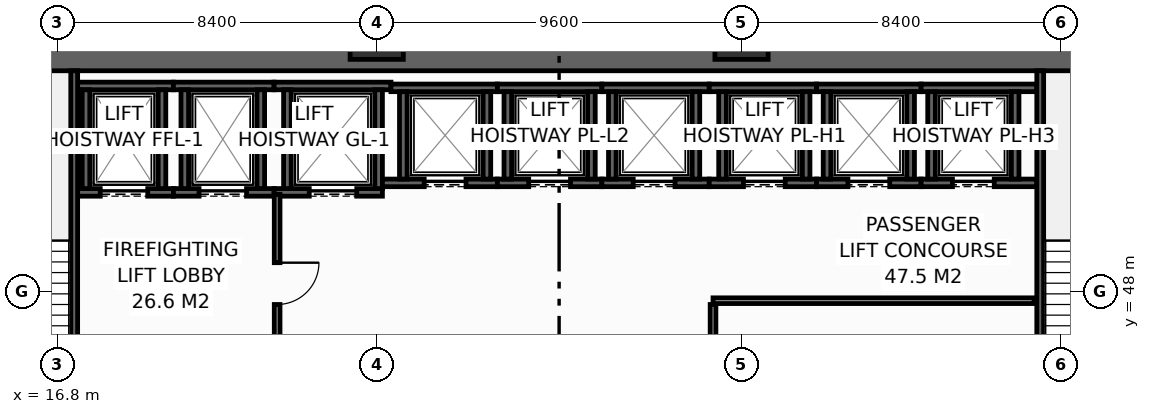
"""IFC4 building model, lengths in metres.
Left out: names, types, materials, properties, quantities, classifications, styles, units other than length and angle.
Written with IfcOpenShell. Run it as: python <this file> out.ifc"""

import sys

from ifc_helpers import new_model, si_unit, direction, frame, frame_2d, origin, origin_2d, place, context, subcontext, project, spatial, rectangle, hollow_rectangle, extrude, element, fill, save


model = new_model("IFC4")
c1 = context("Model", 3, precision=1e-05, world=origin(), true_north=direction((0.0, 1.0)))
c2 = subcontext(c1, "Body", "Model", "MODEL_VIEW")
j1 = project(units=[si_unit("LENGTHUNIT", "METRE"), si_unit("PLANEANGLEUNIT", "RADIAN")], contexts=[c1])
p1 = place(None, origin())
s1 = spatial("IfcSite", under=j1, at=p1, CompositionType="ELEMENT")
p2 = place(p1, origin())
s2 = spatial("IfcBuilding", under=s1, at=p2, CompositionType="ELEMENT")
p3 = place(p2, origin())
s3 = spatial("IfcBuildingStorey", under=s2, at=p3, CompositionType="ELEMENT", Elevation=0.0)
p4 = place(p3, frame((13.5, 54.1, 0.0), z_axis=(0.0, 0.0, 1.0), x_axis=(1.0, 0.0, 0.0)))
e1 = element("IfcWall", 1, at=p4, inside=s3, PredefinedType="SHEAR", context=c2, shape_type="SweptSolid", body=[
    extrude(rectangle(XDim=32.9, YDim=0.6, at=frame_2d((16.45, 0.0))), origin(), (0.0, 0.0, 1.0), 5.7),
])
for number, where, z_axis, x_axis in (
    (2, (25.2, 54.8, 0.0), (0.0, 0.0, 1.0), (1.0, 0.0, 0.0)),
    (3, (34.8, 54.8, 0.0), (0.0, 0.0, 1.0), (1.0, 0.0, 0.0)),
):
    element("IfcColumn", number, at=place(p3, frame(where, z_axis=z_axis, x_axis=x_axis)), inside=s3, PredefinedType="COLUMN", context=c2, shape_type="SweptSolid", body=[
        extrude(hollow_rectangle(XDim=1.4, YDim=1.4, WallThickness=0.065, at=origin_2d()), origin(), (0.0, 0.0, 1.0), 6.0),
    ])
p5 = place(p3, frame((17.33, 50.6, 0.0), z_axis=(0.0, 0.0, 1.0), x_axis=(1.0, 0.0, 0.0)))
e4 = element("IfcWall", 4, at=p5, inside=s3, PredefinedType="SHEAR", context=c2, shape_type="SweptSolid", body=[
    extrude(rectangle(XDim=2.52, YDim=0.2, at=frame_2d((1.26, 0.0))), origin(), (0.0, 0.0, 1.0), 5.7),
])
p6 = place(p5, frame((0.595, 0.0, 0.0)))
e5 = element("IfcOpeningElement", 5, at=p6, cuts=e4, PredefinedType="OPENING", context=c2, shape_type="SweptSolid", body=[
    extrude(rectangle(XDim=1.25, YDim=2.3, at=frame_2d((0.625, 1.15))), frame((0.0, 0.11, 0.0), z_axis=(0.0, -1.0, 0.0), x_axis=(1.0, 0.0, 0.0)), (0.0, 0.0, 1.0), 0.22),
])
p7 = place(p3, frame((17.33, 53.4, 0.0), z_axis=(0.0, 0.0, 1.0), x_axis=(1.0, 0.0, 0.0)))
e6 = element("IfcWall", 6, at=p7, inside=s3, PredefinedType="SHEAR", context=c2, shape_type="SweptSolid", body=[
    extrude(rectangle(XDim=2.52, YDim=0.2, at=frame_2d((1.26, 0.0))), origin(), (0.0, 0.0, 1.0), 5.7),
])
for number, where, z_axis, x_axis in (
    (7, (17.55, 50.7, 0.0), (0.0, 0.0, 1.0), (0.0, 1.0, 0.0)),
    (8, (19.55, 50.7, 0.0), (0.0, 0.0, 1.0), (0.0, 1.0, 0.0)),
):
    element("IfcWall", number, at=place(p3, frame(where, z_axis=z_axis, x_axis=x_axis)), inside=s3, PredefinedType="SHEAR", context=c2, shape_type="SweptSolid", body=[
        extrude(rectangle(XDim=2.6, YDim=0.2, at=frame_2d((1.3, 0.0))), origin(), (0.0, 0.0, 1.0), 5.7),
    ])
p8 = place(p3, frame((19.85, 50.6, 0.0), z_axis=(0.0, 0.0, 1.0), x_axis=(1.0, 0.0, 0.0)))
e9 = element("IfcWall", 9, at=p8, inside=s3, PredefinedType="SHEAR", context=c2, shape_type="SweptSolid", body=[
    extrude(rectangle(XDim=2.65, YDim=0.2, at=frame_2d((1.325, 0.0))), origin(), (0.0, 0.0, 1.0), 5.7),
])
p9 = place(p8, frame((0.675, 0.0, 0.0)))
e10 = element("IfcOpeningElement", 10, at=p9, cuts=e9, PredefinedType="OPENING", context=c2, shape_type="SweptSolid", body=[
    extrude(rectangle(XDim=1.25, YDim=2.3, at=frame_2d((0.625, 1.15))), frame((0.0, 0.11, 0.0), z_axis=(0.0, -1.0, 0.0), x_axis=(1.0, 0.0, 0.0)), (0.0, 0.0, 1.0), 0.22),
])
p10 = place(p3, frame((19.85, 53.4, 0.0), z_axis=(0.0, 0.0, 1.0), x_axis=(1.0, 0.0, 0.0)))
e11 = element("IfcWall", 11, at=p10, inside=s3, PredefinedType="SHEAR", context=c2, shape_type="SweptSolid", body=[
    extrude(rectangle(XDim=2.65, YDim=0.2, at=frame_2d((1.325, 0.0))), origin(), (0.0, 0.0, 1.0), 5.7),
])
for number, where, z_axis, x_axis in (
    (12, (20.15, 50.7, 0.0), (0.0, 0.0, 1.0), (0.0, 1.0, 0.0)),
    (13, (22.15, 50.7, 0.0), (0.0, 0.0, 1.0), (0.0, 1.0, 0.0)),
):
    element("IfcWall", number, at=place(p3, frame(where, z_axis=z_axis, x_axis=x_axis)), inside=s3, PredefinedType="SHEAR", context=c2, shape_type="SweptSolid", body=[
        extrude(rectangle(XDim=2.6, YDim=0.2, at=frame_2d((1.3, 0.0))), origin(), (0.0, 0.0, 1.0), 5.7),
    ])
p11 = place(p3, frame((22.5, 50.6, 0.0), z_axis=(0.0, 0.0, 1.0), x_axis=(1.0, 0.0, 0.0)))
e14 = element("IfcWall", 14, at=p11, inside=s3, PredefinedType="SHEAR", context=c2, shape_type="SweptSolid", body=[
    extrude(rectangle(XDim=2.85, YDim=0.2, at=frame_2d((1.425, 0.0))), origin(), (0.0, 0.0, 1.0), 5.7),
])
p12 = place(p11, frame((0.925, 0.0, 0.0)))
e15 = element("IfcOpeningElement", 15, at=p12, cuts=e14, PredefinedType="OPENING", context=c2, shape_type="SweptSolid", body=[
    extrude(rectangle(XDim=1.25, YDim=2.3, at=frame_2d((0.625, 1.15))), frame((0.0, 0.11, 0.0), z_axis=(0.0, -1.0, 0.0), x_axis=(1.0, 0.0, 0.0)), (0.0, 0.0, 1.0), 0.22),
])
p13 = place(p3, frame((22.5, 53.4, 0.0), z_axis=(0.0, 0.0, 1.0), x_axis=(1.0, 0.0, 0.0)))
e16 = element("IfcWall", 16, at=p13, inside=s3, PredefinedType="SHEAR", context=c2, shape_type="SweptSolid", body=[
    extrude(rectangle(XDim=3.075, YDim=0.2, at=frame_2d((1.538, 0.0))), origin(), (0.0, 0.0, 1.0), 5.7),
])
for number, where, z_axis, x_axis in (
    (17, (22.85, 50.7, 0.0), (0.0, 0.0, 1.0), (0.0, 1.0, 0.0)),
    (18, (25.25, 50.7, 0.0), (0.0, 0.0, 1.0), (0.0, 1.0, 0.0)),
):
    element("IfcWall", number, at=place(p3, frame(where, z_axis=z_axis, x_axis=x_axis)), inside=s3, PredefinedType="SHEAR", context=c2, shape_type="SweptSolid", body=[
        extrude(rectangle(XDim=2.6, YDim=0.2, at=frame_2d((1.3, 0.0))), origin(), (0.0, 0.0, 1.0), 5.7),
    ])
p14 = place(p3, frame((25.35, 50.85, 0.0), z_axis=(0.0, 0.0, 1.0), x_axis=(1.0, 0.0, 0.0)))
e19 = element("IfcWall", 19, at=p14, inside=s3, PredefinedType="SHEAR", context=c2, shape_type="SweptSolid", body=[
    extrude(rectangle(XDim=3.025, YDim=0.2, at=frame_2d((1.512, 0.0))), origin(), (0.0, 0.0, 1.0), 5.7),
])
p15 = place(p14, frame((1.1, 0.0, 0.0)))
e20 = element("IfcOpeningElement", 20, at=p15, cuts=e19, PredefinedType="OPENING", context=c2, shape_type="SweptSolid", body=[
    extrude(rectangle(XDim=1.1, YDim=2.2, at=frame_2d((0.55, 1.1))), frame((0.0, 0.11, 0.0), z_axis=(0.0, -1.0, 0.0), x_axis=(1.0, 0.0, 0.0)), (0.0, 0.0, 1.0), 0.22),
])
p16 = place(p3, frame((25.575, 53.35, 0.0), z_axis=(0.0, 0.0, 1.0), x_axis=(1.0, 0.0, 0.0)))
e21 = element("IfcWall", 21, at=p16, inside=s3, PredefinedType="SHEAR", context=c2, shape_type="SweptSolid", body=[
    extrude(rectangle(XDim=2.8, YDim=0.2, at=frame_2d((1.4, 0.0))), origin(), (0.0, 0.0, 1.0), 5.7),
])
for number, where, z_axis, x_axis in (
    (22, (25.9, 50.95, 0.0), (0.0, 0.0, 1.0), (0.0, 1.0, 0.0)),
    (23, (28.1, 50.95, 0.0), (0.0, 0.0, 1.0), (0.0, 1.0, 0.0)),
):
    element("IfcWall", number, at=place(p3, frame(where, z_axis=z_axis, x_axis=x_axis)), inside=s3, PredefinedType="SHEAR", context=c2, shape_type="SweptSolid", body=[
        extrude(rectangle(XDim=2.3, YDim=0.2, at=frame_2d((1.15, 0.0))), origin(), (0.0, 0.0, 1.0), 5.7),
    ])
p17 = place(p3, frame((28.375, 50.85, 0.0), z_axis=(0.0, 0.0, 1.0), x_axis=(1.0, 0.0, 0.0)))
e24 = element("IfcWall", 24, at=p17, inside=s3, PredefinedType="SHEAR", context=c2, shape_type="SweptSolid", body=[
    extrude(rectangle(XDim=2.75, YDim=0.2, at=frame_2d((1.375, 0.0))), origin(), (0.0, 0.0, 1.0), 5.7),
])
p18 = place(p17, frame((0.825, 0.0, 0.0)))
e25 = element("IfcOpeningElement", 25, at=p18, cuts=e24, PredefinedType="OPENING", context=c2, shape_type="SweptSolid", body=[
    extrude(rectangle(XDim=1.1, YDim=2.2, at=frame_2d((0.55, 1.1))), frame((0.0, 0.11, 0.0), z_axis=(0.0, -1.0, 0.0), x_axis=(1.0, 0.0, 0.0)), (0.0, 0.0, 1.0), 0.22),
])
p19 = place(p3, frame((28.375, 53.35, 0.0), z_axis=(0.0, 0.0, 1.0), x_axis=(1.0, 0.0, 0.0)))
e26 = element("IfcWall", 26, at=p19, inside=s3, PredefinedType="SHEAR", context=c2, shape_type="SweptSolid", body=[
    extrude(rectangle(XDim=2.75, YDim=0.2, at=frame_2d((1.375, 0.0))), origin(), (0.0, 0.0, 1.0), 5.7),
])
for number, where, z_axis, x_axis in (
    (27, (28.65, 50.95, 0.0), (0.0, 0.0, 1.0), (0.0, 1.0, 0.0)),
    (28, (30.85, 50.95, 0.0), (0.0, 0.0, 1.0), (0.0, 1.0, 0.0)),
):
    element("IfcWall", number, at=place(p3, frame(where, z_axis=z_axis, x_axis=x_axis)), inside=s3, PredefinedType="SHEAR", context=c2, shape_type="SweptSolid", body=[
        extrude(rectangle(XDim=2.3, YDim=0.2, at=frame_2d((1.15, 0.0))), origin(), (0.0, 0.0, 1.0), 5.7),
    ])
p20 = place(p3, frame((31.125, 50.85, 0.0), z_axis=(0.0, 0.0, 1.0), x_axis=(1.0, 0.0, 0.0)))
e29 = element("IfcWall", 29, at=p20, inside=s3, PredefinedType="SHEAR", context=c2, shape_type="SweptSolid", body=[
    extrude(rectangle(XDim=2.825, YDim=0.2, at=frame_2d((1.413, 0.0))), origin(), (0.0, 0.0, 1.0), 5.7),
])
p21 = place(p20, frame((0.825, 0.0, 0.0)))
e30 = element("IfcOpeningElement", 30, at=p21, cuts=e29, PredefinedType="OPENING", context=c2, shape_type="SweptSolid", body=[
    extrude(rectangle(XDim=1.1, YDim=2.2, at=frame_2d((0.55, 1.1))), frame((0.0, 0.11, 0.0), z_axis=(0.0, -1.0, 0.0), x_axis=(1.0, 0.0, 0.0)), (0.0, 0.0, 1.0), 0.22),
])
p22 = place(p3, frame((31.125, 53.35, 0.0), z_axis=(0.0, 0.0, 1.0), x_axis=(1.0, 0.0, 0.0)))
e31 = element("IfcWall", 31, at=p22, inside=s3, PredefinedType="SHEAR", context=c2, shape_type="SweptSolid", body=[
    extrude(rectangle(XDim=2.825, YDim=0.2, at=frame_2d((1.413, 0.0))), origin(), (0.0, 0.0, 1.0), 5.7),
])
for number, where, z_axis, x_axis in (
    (32, (31.4, 50.95, 0.0), (0.0, 0.0, 1.0), (0.0, 1.0, 0.0)),
    (33, (33.6, 50.95, 0.0), (0.0, 0.0, 1.0), (0.0, 1.0, 0.0)),
):
    element("IfcWall", number, at=place(p3, frame(where, z_axis=z_axis, x_axis=x_axis)), inside=s3, PredefinedType="SHEAR", context=c2, shape_type="SweptSolid", body=[
        extrude(rectangle(XDim=2.3, YDim=0.2, at=frame_2d((1.15, 0.0))), origin(), (0.0, 0.0, 1.0), 5.7),
    ])
p23 = place(p3, frame((33.95, 50.85, 0.0), z_axis=(0.0, 0.0, 1.0), x_axis=(1.0, 0.0, 0.0)))
e34 = element("IfcWall", 34, at=p23, inside=s3, PredefinedType="SHEAR", context=c2, shape_type="SweptSolid", body=[
    extrude(rectangle(XDim=2.825, YDim=0.2, at=frame_2d((1.413, 0.0))), origin(), (0.0, 0.0, 1.0), 5.7),
])
p24 = place(p23, frame((0.9, 0.0, 0.0)))
e35 = element("IfcOpeningElement", 35, at=p24, cuts=e34, PredefinedType="OPENING", context=c2, shape_type="SweptSolid", body=[
    extrude(rectangle(XDim=1.1, YDim=2.2, at=frame_2d((0.55, 1.1))), frame((0.0, 0.11, 0.0), z_axis=(0.0, -1.0, 0.0), x_axis=(1.0, 0.0, 0.0)), (0.0, 0.0, 1.0), 0.22),
])
p25 = place(p3, frame((33.95, 53.35, 0.0), z_axis=(0.0, 0.0, 1.0), x_axis=(1.0, 0.0, 0.0)))
e36 = element("IfcWall", 36, at=p25, inside=s3, PredefinedType="SHEAR", context=c2, shape_type="SweptSolid", body=[
    extrude(rectangle(XDim=2.825, YDim=0.2, at=frame_2d((1.413, 0.0))), origin(), (0.0, 0.0, 1.0), 5.7),
])
for number, where, z_axis, x_axis in (
    (37, (34.3, 50.95, 0.0), (0.0, 0.0, 1.0), (0.0, 1.0, 0.0)),
    (38, (36.5, 50.95, 0.0), (0.0, 0.0, 1.0), (0.0, 1.0, 0.0)),
):
    element("IfcWall", number, at=place(p3, frame(where, z_axis=z_axis, x_axis=x_axis)), inside=s3, PredefinedType="SHEAR", context=c2, shape_type="SweptSolid", body=[
        extrude(rectangle(XDim=2.3, YDim=0.2, at=frame_2d((1.15, 0.0))), origin(), (0.0, 0.0, 1.0), 5.7),
    ])
p26 = place(p3, frame((36.775, 50.85, 0.0), z_axis=(0.0, 0.0, 1.0), x_axis=(1.0, 0.0, 0.0)))
e39 = element("IfcWall", 39, at=p26, inside=s3, PredefinedType="SHEAR", context=c2, shape_type="SweptSolid", body=[
    extrude(rectangle(XDim=2.75, YDim=0.2, at=frame_2d((1.375, 0.0))), origin(), (0.0, 0.0, 1.0), 5.7),
])
p27 = place(p26, frame((0.825, 0.0, 0.0)))
e40 = element("IfcOpeningElement", 40, at=p27, cuts=e39, PredefinedType="OPENING", context=c2, shape_type="SweptSolid", body=[
    extrude(rectangle(XDim=1.1, YDim=2.2, at=frame_2d((0.55, 1.1))), frame((0.0, 0.11, 0.0), z_axis=(0.0, -1.0, 0.0), x_axis=(1.0, 0.0, 0.0)), (0.0, 0.0, 1.0), 0.22),
])
p28 = place(p3, frame((36.775, 53.35, 0.0), z_axis=(0.0, 0.0, 1.0), x_axis=(1.0, 0.0, 0.0)))
e41 = element("IfcWall", 41, at=p28, inside=s3, PredefinedType="SHEAR", context=c2, shape_type="SweptSolid", body=[
    extrude(rectangle(XDim=2.75, YDim=0.2, at=frame_2d((1.375, 0.0))), origin(), (0.0, 0.0, 1.0), 5.7),
])
for number, where, z_axis, x_axis in (
    (42, (37.05, 50.95, 0.0), (0.0, 0.0, 1.0), (0.0, 1.0, 0.0)),
    (43, (39.25, 50.95, 0.0), (0.0, 0.0, 1.0), (0.0, 1.0, 0.0)),
):
    element("IfcWall", number, at=place(p3, frame(where, z_axis=z_axis, x_axis=x_axis)), inside=s3, PredefinedType="SHEAR", context=c2, shape_type="SweptSolid", body=[
        extrude(rectangle(XDim=2.3, YDim=0.2, at=frame_2d((1.15, 0.0))), origin(), (0.0, 0.0, 1.0), 5.7),
    ])
p29 = place(p3, frame((39.525, 50.85, 0.0), z_axis=(0.0, 0.0, 1.0), x_axis=(1.0, 0.0, 0.0)))
e44 = element("IfcWall", 44, at=p29, inside=s3, PredefinedType="SHEAR", context=c2, shape_type="SweptSolid", body=[
    extrude(rectangle(XDim=3.045, YDim=0.2, at=frame_2d((1.522, 0.0))), origin(), (0.0, 0.0, 1.0), 5.7),
])
p30 = place(p29, frame((0.825, 0.0, 0.0)))
e45 = element("IfcOpeningElement", 45, at=p30, cuts=e44, PredefinedType="OPENING", context=c2, shape_type="SweptSolid", body=[
    extrude(rectangle(XDim=1.1, YDim=2.2, at=frame_2d((0.55, 1.1))), frame((0.0, 0.11, 0.0), z_axis=(0.0, -1.0, 0.0), x_axis=(1.0, 0.0, 0.0)), (0.0, 0.0, 1.0), 0.22),
])
p31 = place(p3, frame((39.525, 53.35, 0.0), z_axis=(0.0, 0.0, 1.0), x_axis=(1.0, 0.0, 0.0)))
e46 = element("IfcWall", 46, at=p31, inside=s3, PredefinedType="SHEAR", context=c2, shape_type="SweptSolid", body=[
    extrude(rectangle(XDim=3.045, YDim=0.2, at=frame_2d((1.522, 0.0))), origin(), (0.0, 0.0, 1.0), 5.7),
])
for number, where, z_axis, x_axis in (
    (47, (39.8, 50.95, 0.0), (0.0, 0.0, 1.0), (0.0, 1.0, 0.0)),
    (48, (42.0, 50.95, 0.0), (0.0, 0.0, 1.0), (0.0, 1.0, 0.0)),
):
    element("IfcWall", number, at=place(p3, frame(where, z_axis=z_axis, x_axis=x_axis)), inside=s3, PredefinedType="SHEAR", context=c2, shape_type="SweptSolid", body=[
        extrude(rectangle(XDim=2.3, YDim=0.2, at=frame_2d((1.15, 0.0))), origin(), (0.0, 0.0, 1.0), 5.7),
    ])
p32 = place(p3, frame((17.24, 43.4, 0.0), z_axis=(0.0, 0.0, 1.0), x_axis=(0.0, 1.0, 0.0)))
e49 = element("IfcWall", 49, at=p32, inside=s3, PredefinedType="SHEAR", context=c2, shape_type="SweptSolid", body=[
    extrude(rectangle(XDim=10.4, YDim=0.18, at=frame_2d((5.2, 0.0))), origin(), (0.0, 0.0, 1.0), 5.7),
])
p33 = place(p32, frame((0.16, 0.0, 0.0)))
e50 = element("IfcOpeningElement", 50, at=p33, cuts=e49, PredefinedType="OPENING", context=c2, shape_type="SweptSolid", body=[
    extrude(rectangle(XDim=1.0, YDim=2.15, at=frame_2d((0.5, 1.075))), frame((0.0, 0.1, 0.0), z_axis=(0.0, -1.0, 0.0), x_axis=(1.0, 0.0, 0.0)), (0.0, 0.0, 1.0), 0.2),
])
p34 = place(p3, frame((42.66, 53.8, 0.0), z_axis=(0.0, 0.0, 1.0), x_axis=(0.0, -1.0, 0.0)))
e51 = element("IfcWall", 51, at=p34, inside=s3, PredefinedType="SHEAR", context=c2, shape_type="SweptSolid", body=[
    extrude(rectangle(XDim=10.4, YDim=0.18, at=frame_2d((5.2, 0.0))), origin(), (0.0, 0.0, 1.0), 5.7),
])
p35 = place(p34, frame((8.99, 0.0, 0.0)))
e52 = element("IfcOpeningElement", 52, at=p35, cuts=e51, PredefinedType="OPENING", context=c2, shape_type="SweptSolid", body=[
    extrude(rectangle(XDim=1.1, YDim=2.15, at=frame_2d((0.55, 1.075))), frame((0.0, 0.1, 0.0), z_axis=(0.0, -1.0, 0.0), x_axis=(1.0, 0.0, 0.0)), (0.0, 0.0, 1.0), 0.2),
])
p36 = place(p3, frame((22.58, 50.55, 0.0), z_axis=(0.0, 0.0, 1.0), x_axis=(0.0, -1.0, 0.0)))
e53 = element("IfcWall", 53, at=p36, inside=s3, PredefinedType="PARTITIONING", context=c2, shape_type="SweptSolid", body=[
    extrude(rectangle(XDim=5.33, YDim=0.15, at=frame_2d((2.665, 0.0))), origin(), (0.0, 0.0, 1.0), 5.7),
])
p37 = place(p36, frame((1.8, 0.0, 0.0)))
e54 = element("IfcOpeningElement", 54, at=p37, cuts=e53, PredefinedType="OPENING", context=c2, shape_type="SweptSolid", body=[
    extrude(rectangle(XDim=1.1, YDim=2.15, at=frame_2d((0.55, 1.075))), frame((0.0, 0.085, 0.0), z_axis=(0.0, -1.0, 0.0), x_axis=(1.0, 0.0, 0.0)), (0.0, 0.0, 1.0), 0.17),
])
p38 = place(p3, frame((34.05, 47.75, 0.0), z_axis=(0.0, 0.0, 1.0), x_axis=(1.0, 0.0, 0.0)))
e55 = element("IfcWall", 55, at=p38, inside=s3, PredefinedType="PARTITIONING", context=c2, shape_type="SweptSolid", body=[
    extrude(rectangle(XDim=8.45, YDim=0.15, at=frame_2d((4.225, 0.0))), origin(), (0.0, 0.0, 1.0), 5.7),
])
p39 = place(p3, frame((34.05, 45.22, 0.0), z_axis=(0.0, 0.0, 1.0), x_axis=(0.0, 1.0, 0.0)))
e56 = element("IfcWall", 56, at=p39, inside=s3, PredefinedType="PARTITIONING", context=c2, shape_type="SweptSolid", body=[
    extrude(rectangle(XDim=2.43, YDim=0.15, at=frame_2d((1.215, 0.0))), origin(), (0.0, 0.0, 1.0), 5.7),
])
p40 = place(p6, origin())
e57 = element("IfcDoor", 57, at=p40, inside=s3, OperationType="SLIDING_TO_LEFT", PredefinedType="DOOR", context=c2, shape_type="SweptSolid", body=[
    extrude(rectangle(XDim=1.25, YDim=2.3, at=frame_2d((0.625, 1.15))), frame((0.0, 0.025, 0.0), z_axis=(0.0, -1.0, 0.0), x_axis=(1.0, 0.0, 0.0)), (0.0, 0.0, 1.0), 0.05),
])
fill(e5, e57)
p41 = place(p9, origin())
e58 = element("IfcDoor", 58, at=p41, inside=s3, OperationType="SLIDING_TO_LEFT", PredefinedType="DOOR", context=c2, shape_type="SweptSolid", body=[
    extrude(rectangle(XDim=1.25, YDim=2.3, at=frame_2d((0.625, 1.15))), frame((0.0, 0.025, 0.0), z_axis=(0.0, -1.0, 0.0), x_axis=(1.0, 0.0, 0.0)), (0.0, 0.0, 1.0), 0.05),
])
fill(e10, e58)
p42 = place(p12, origin())
e59 = element("IfcDoor", 59, at=p42, inside=s3, OperationType="SLIDING_TO_LEFT", PredefinedType="DOOR", context=c2, shape_type="SweptSolid", body=[
    extrude(rectangle(XDim=1.25, YDim=2.3, at=frame_2d((0.625, 1.15))), frame((0.0, 0.025, 0.0), z_axis=(0.0, -1.0, 0.0), x_axis=(1.0, 0.0, 0.0)), (0.0, 0.0, 1.0), 0.05),
])
fill(e15, e59)
p43 = place(p15, origin())
e60 = element("IfcDoor", 60, at=p43, inside=s3, OperationType="SLIDING_TO_LEFT", PredefinedType="DOOR", context=c2, shape_type="SweptSolid", body=[
    extrude(rectangle(XDim=1.1, YDim=2.2, at=frame_2d((0.55, 1.1))), frame((0.0, 0.025, 0.0), z_axis=(0.0, -1.0, 0.0), x_axis=(1.0, 0.0, 0.0)), (0.0, 0.0, 1.0), 0.05),
])
fill(e20, e60)
p44 = place(p18, origin())
e61 = element("IfcDoor", 61, at=p44, inside=s3, OperationType="SLIDING_TO_LEFT", PredefinedType="DOOR", context=c2, shape_type="SweptSolid", body=[
    extrude(rectangle(XDim=1.1, YDim=2.2, at=frame_2d((0.55, 1.1))), frame((0.0, 0.025, 0.0), z_axis=(0.0, -1.0, 0.0), x_axis=(1.0, 0.0, 0.0)), (0.0, 0.0, 1.0), 0.05),
])
fill(e25, e61)
p45 = place(p21, origin())
e62 = element("IfcDoor", 62, at=p45, inside=s3, OperationType="SLIDING_TO_LEFT", PredefinedType="DOOR", context=c2, shape_type="SweptSolid", body=[
    extrude(rectangle(XDim=1.1, YDim=2.2, at=frame_2d((0.55, 1.1))), frame((0.0, 0.025, 0.0), z_axis=(0.0, -1.0, 0.0), x_axis=(1.0, 0.0, 0.0)), (0.0, 0.0, 1.0), 0.05),
])
fill(e30, e62)
p46 = place(p24, origin())
e63 = element("IfcDoor", 63, at=p46, inside=s3, OperationType="SLIDING_TO_LEFT", PredefinedType="DOOR", context=c2, shape_type="SweptSolid", body=[
    extrude(rectangle(XDim=1.1, YDim=2.2, at=frame_2d((0.55, 1.1))), frame((0.0, 0.025, 0.0), z_axis=(0.0, -1.0, 0.0), x_axis=(1.0, 0.0, 0.0)), (0.0, 0.0, 1.0), 0.05),
])
fill(e35, e63)
p47 = place(p27, origin())
e64 = element("IfcDoor", 64, at=p47, inside=s3, OperationType="SLIDING_TO_LEFT", PredefinedType="DOOR", context=c2, shape_type="SweptSolid", body=[
    extrude(rectangle(XDim=1.1, YDim=2.2, at=frame_2d((0.55, 1.1))), frame((0.0, 0.025, 0.0), z_axis=(0.0, -1.0, 0.0), x_axis=(1.0, 0.0, 0.0)), (0.0, 0.0, 1.0), 0.05),
])
fill(e40, e64)
p48 = place(p30, origin())
e65 = element("IfcDoor", 65, at=p48, inside=s3, OperationType="SLIDING_TO_LEFT", PredefinedType="DOOR", context=c2, shape_type="SweptSolid", body=[
    extrude(rectangle(XDim=1.1, YDim=2.2, at=frame_2d((0.55, 1.1))), frame((0.0, 0.025, 0.0), z_axis=(0.0, -1.0, 0.0), x_axis=(1.0, 0.0, 0.0)), (0.0, 0.0, 1.0), 0.05),
])
fill(e45, e65)
p49 = place(p37, origin())
e66 = element("IfcDoor", 66, at=p49, inside=s3, OperationType="SINGLE_SWING_LEFT", PredefinedType="DOOR", context=c2, shape_type="SweptSolid", body=[
    extrude(rectangle(XDim=1.1, YDim=2.15, at=frame_2d((0.55, 1.075))), frame((0.0, 0.025, 0.0), z_axis=(0.0, -1.0, 0.0), x_axis=(1.0, 0.0, 0.0)), (0.0, 0.0, 1.0), 0.05),
])
fill(e54, e66)
save(model, sys.argv[1])
